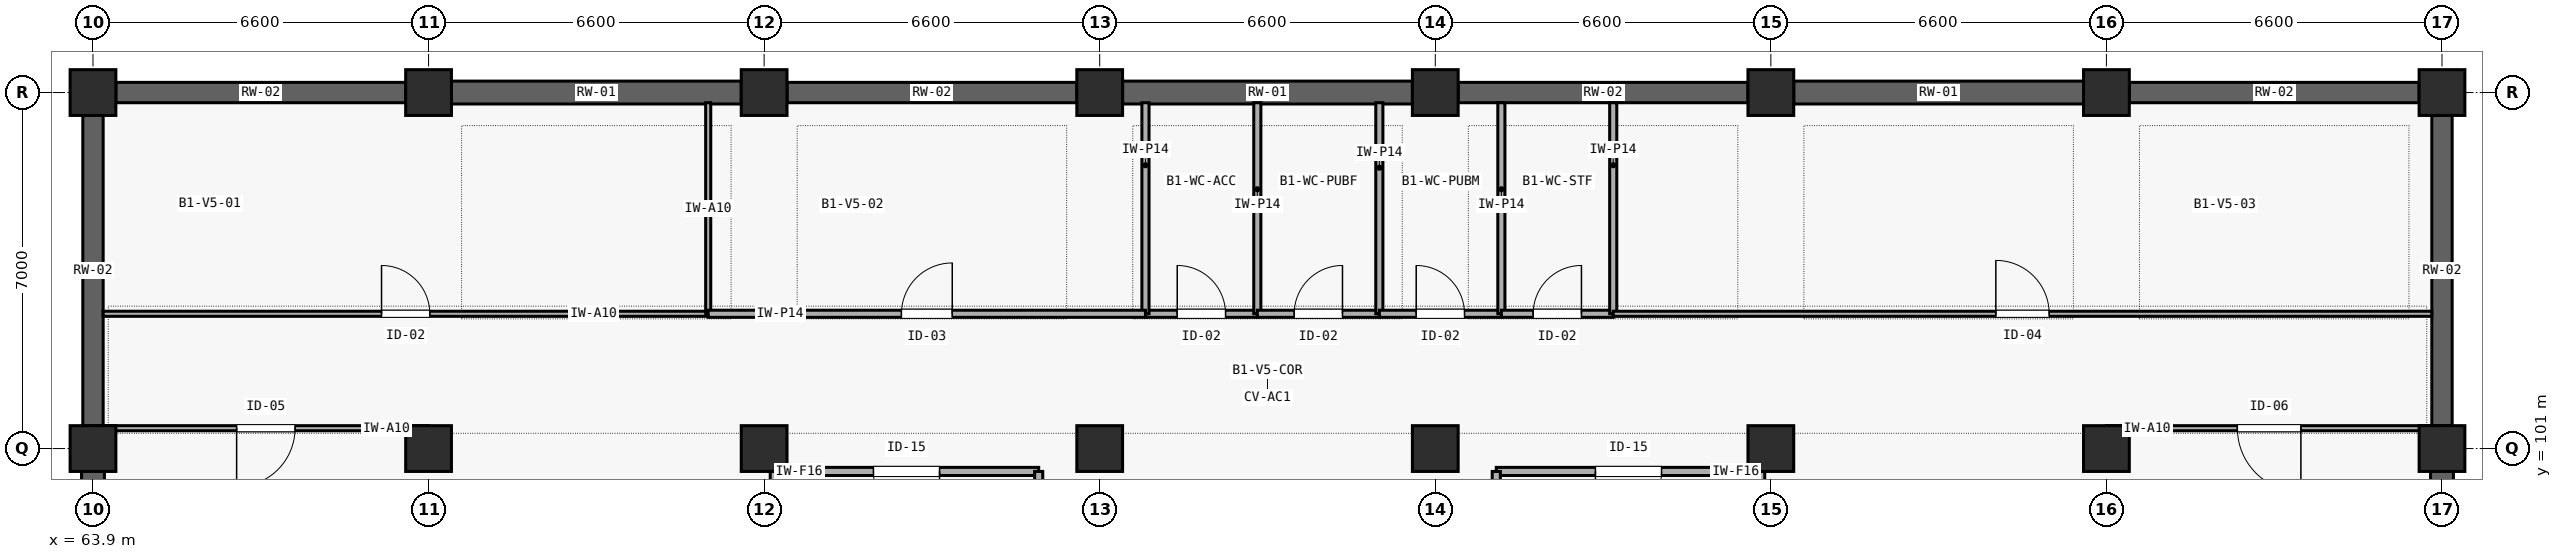
"""IFC4 building model, lengths in metres.
Left out: names, types, materials, properties, quantities, classifications, styles, units other than length and angle.
Written with IfcOpenShell. Run it as: python <this file> out.ifc"""

import sys

from ifc_helpers import new_model, si_unit, direction, frame, frame_2d, origin, origin_2d, place, context, subcontext, project, spatial, rectangle, extrude, element, fill, save


model = new_model("IFC4")
c1 = context("Model", 3, precision=1e-05, world=origin(), true_north=direction((0.0, 1.0)))
c2 = subcontext(c1, "Body", "Model", "MODEL_VIEW")
j1 = project(units=[si_unit("LENGTHUNIT", "METRE"), si_unit("PLANEANGLEUNIT", "RADIAN")], contexts=[c1])
p1 = place(None, origin())
s1 = spatial("IfcSite", under=j1, at=p1, CompositionType="ELEMENT")
p2 = place(p1, origin())
s2 = spatial("IfcBuilding", under=s1, at=p2, CompositionType="ELEMENT")
p3 = place(p2, frame((0.0, 0.0, -4.2)))
s3 = spatial("IfcBuildingStorey", under=s2, at=p3, CompositionType="ELEMENT", Elevation=-4.2)
for number, where, z_axis, x_axis in (
    (1, (63.9, 101.0, -0.4), (0.0, 0.0, 1.0), (1.0, 0.0, 0.0)),
    (2, (63.9, 108.0, -0.4), (0.0, 0.0, 1.0), (1.0, 0.0, 0.0)),
    (3, (70.5, 101.0, -0.4), (0.0, 0.0, 1.0), (1.0, 0.0, 0.0)),
    (4, (70.5, 108.0, -0.4), (0.0, 0.0, 1.0), (1.0, 0.0, 0.0)),
    (5, (77.1, 101.0, -0.4), (0.0, 0.0, 1.0), (1.0, 0.0, 0.0)),
    (6, (77.1, 108.0, -0.4), (0.0, 0.0, 1.0), (1.0, 0.0, 0.0)),
    (7, (83.7, 101.0, -0.4), (0.0, 0.0, 1.0), (1.0, 0.0, 0.0)),
    (8, (83.7, 108.0, -0.4), (0.0, 0.0, 1.0), (1.0, 0.0, 0.0)),
    (9, (90.3, 101.0, -0.4), (0.0, 0.0, 1.0), (1.0, 0.0, 0.0)),
    (10, (90.3, 108.0, -0.4), (0.0, 0.0, 1.0), (1.0, 0.0, 0.0)),
    (11, (96.9, 101.0, -0.4), (0.0, 0.0, 1.0), (1.0, 0.0, 0.0)),
    (12, (96.9, 108.0, -0.4), (0.0, 0.0, 1.0), (1.0, 0.0, 0.0)),
    (13, (103.5, 101.0, -0.4), (0.0, 0.0, 1.0), (1.0, 0.0, 0.0)),
    (14, (103.5, 108.0, -0.4), (0.0, 0.0, 1.0), (1.0, 0.0, 0.0)),
    (15, (110.1, 101.0, -0.4), (0.0, 0.0, 1.0), (1.0, 0.0, 0.0)),
    (16, (110.1, 108.0, -0.4), (0.0, 0.0, 1.0), (1.0, 0.0, 0.0)),
):
    element("IfcColumn", number, at=place(p3, frame(where, z_axis=z_axis, x_axis=x_axis)), inside=s3, PredefinedType="COLUMN", context=c2, shape_type="SweptSolid", body=[
        extrude(rectangle(XDim=0.9, YDim=0.9, at=origin_2d()), origin(), (0.0, 0.0, 1.0), 4.6),
    ])
p4 = place(p3, frame((64.35, 108.0, 0.0), z_axis=(0.0, 0.0, 1.0), x_axis=(1.0, 0.0, 0.0)))
e17 = element("IfcWall", 17, at=p4, inside=s3, PredefinedType="SHEAR", context=c2, shape_type="SweptSolid", body=[
    extrude(rectangle(XDim=5.7, YDim=0.4, at=frame_2d((2.85, 0.0))), origin(), (0.0, 0.0, 1.0), 3.85),
])
p5 = place(p3, frame((70.95, 108.0, 0.0), z_axis=(0.0, 0.0, 1.0), x_axis=(1.0, 0.0, 0.0)))
e18 = element("IfcWall", 18, at=p5, inside=s3, PredefinedType="SHEAR", context=c2, shape_type="SweptSolid", body=[
    extrude(rectangle(XDim=5.7, YDim=0.45, at=frame_2d((2.85, 0.0))), origin(), (0.0, 0.0, 1.0), 3.85),
])
p6 = place(p3, frame((77.55, 108.0, 0.0), z_axis=(0.0, 0.0, 1.0), x_axis=(1.0, 0.0, 0.0)))
e19 = element("IfcWall", 19, at=p6, inside=s3, PredefinedType="SHEAR", context=c2, shape_type="SweptSolid", body=[
    extrude(rectangle(XDim=5.7, YDim=0.4, at=frame_2d((2.85, 0.0))), origin(), (0.0, 0.0, 1.0), 3.85),
])
p7 = place(p3, frame((84.15, 108.0, 0.0), z_axis=(0.0, 0.0, 1.0), x_axis=(1.0, 0.0, 0.0)))
e20 = element("IfcWall", 20, at=p7, inside=s3, PredefinedType="SHEAR", context=c2, shape_type="SweptSolid", body=[
    extrude(rectangle(XDim=5.7, YDim=0.45, at=frame_2d((2.85, 0.0))), origin(), (0.0, 0.0, 1.0), 3.85),
])
p8 = place(p3, frame((90.75, 108.0, 0.0), z_axis=(0.0, 0.0, 1.0), x_axis=(1.0, 0.0, 0.0)))
e21 = element("IfcWall", 21, at=p8, inside=s3, PredefinedType="SHEAR", context=c2, shape_type="SweptSolid", body=[
    extrude(rectangle(XDim=5.7, YDim=0.4, at=frame_2d((2.85, 0.0))), origin(), (0.0, 0.0, 1.0), 3.85),
])
p9 = place(p3, frame((97.35, 108.0, 0.0), z_axis=(0.0, 0.0, 1.0), x_axis=(1.0, 0.0, 0.0)))
e22 = element("IfcWall", 22, at=p9, inside=s3, PredefinedType="SHEAR", context=c2, shape_type="SweptSolid", body=[
    extrude(rectangle(XDim=5.7, YDim=0.45, at=frame_2d((2.85, 0.0))), origin(), (0.0, 0.0, 1.0), 3.85),
])
p10 = place(p3, frame((103.95, 108.0, 0.0), z_axis=(0.0, 0.0, 1.0), x_axis=(1.0, 0.0, 0.0)))
e23 = element("IfcWall", 23, at=p10, inside=s3, PredefinedType="SHEAR", context=c2, shape_type="SweptSolid", body=[
    extrude(rectangle(XDim=5.7, YDim=0.4, at=frame_2d((2.85, 0.0))), origin(), (0.0, 0.0, 1.0), 3.85),
])
p11 = place(p3, frame((63.9, 94.35, 0.0), z_axis=(0.0, 0.0, 1.0), x_axis=(0.0, 1.0, 0.0)))
e24 = element("IfcWall", 24, at=p11, inside=s3, PredefinedType="SHEAR", context=c2, shape_type="SweptSolid", body=[
    extrude(rectangle(XDim=6.2, YDim=0.45, at=frame_2d((3.1, 0.0))), origin(), (0.0, 0.0, 1.0), 3.85),
])
p12 = place(p3, frame((63.9, 101.45, 0.0), z_axis=(0.0, 0.0, 1.0), x_axis=(0.0, 1.0, 0.0)))
e25 = element("IfcWall", 25, at=p12, inside=s3, PredefinedType="SHEAR", context=c2, shape_type="SweptSolid", body=[
    extrude(rectangle(XDim=6.1, YDim=0.4, at=frame_2d((3.05, 0.0))), origin(), (0.0, 0.0, 1.0), 3.85),
])
p13 = place(p3, frame((110.1, 94.35, 0.0), z_axis=(0.0, 0.0, 1.0), x_axis=(0.0, 1.0, 0.0)))
e26 = element("IfcWall", 26, at=p13, inside=s3, PredefinedType="SHEAR", context=c2, shape_type="SweptSolid", body=[
    extrude(rectangle(XDim=6.2, YDim=0.45, at=frame_2d((3.1, 0.0))), origin(), (0.0, 0.0, 1.0), 3.85),
])
p14 = place(p3, frame((110.1, 101.45, 0.0), z_axis=(0.0, 0.0, 1.0), x_axis=(0.0, 1.0, 0.0)))
e27 = element("IfcWall", 27, at=p14, inside=s3, PredefinedType="SHEAR", context=c2, shape_type="SweptSolid", body=[
    extrude(rectangle(XDim=6.1, YDim=0.4, at=frame_2d((3.05, 0.0))), origin(), (0.0, 0.0, 1.0), 3.85),
])
p15 = place(p3, frame((77.3, 100.55, 0.0), z_axis=(0.0, 0.0, 1.0), x_axis=(1.0, 0.0, 0.0)))
e28 = element("IfcWall", 28, at=p15, inside=s3, PredefinedType="SOLIDWALL", context=c2, shape_type="SweptSolid", body=[
    extrude(rectangle(XDim=5.2, YDim=0.16, at=frame_2d((2.6, 0.0))), origin(), (0.0, 0.0, 1.0), 3.9),
])
p16 = place(p15, frame((1.95, 0.0, 0.0)))
e29 = element("IfcOpeningElement", 29, at=p16, cuts=e28, PredefinedType="OPENING", context=c2, shape_type="SweptSolid", body=[
    extrude(rectangle(XDim=1.3, YDim=2.15, at=frame_2d((0.65, 1.075))), frame((0.0, 0.09, 0.0), z_axis=(0.0, -1.0, 0.0), x_axis=(1.0, 0.0, 0.0)), (0.0, 0.0, 1.0), 0.18),
])
p17 = place(p3, frame((77.3, 97.5, 0.0), z_axis=(0.0, 0.0, 1.0), x_axis=(0.0, 1.0, 0.0)))
e30 = element("IfcWall", 30, at=p17, inside=s3, PredefinedType="SOLIDWALL", context=c2, shape_type="SweptSolid", body=[
    extrude(rectangle(XDim=3.05, YDim=0.16, at=frame_2d((1.525, 0.0))), origin(), (0.0, 0.0, 1.0), 3.405),
])
p18 = place(p3, frame((82.5, 97.5, 0.0), z_axis=(0.0, 0.0, 1.0), x_axis=(0.0, 1.0, 0.0)))
e31 = element("IfcWall", 31, at=p18, inside=s3, PredefinedType="SOLIDWALL", context=c2, shape_type="SweptSolid", body=[
    extrude(rectangle(XDim=3.05, YDim=0.16, at=frame_2d((1.525, 0.0))), origin(), (0.0, 0.0, 1.0), 3.9),
])
p19 = place(p3, frame((91.5, 100.55, 0.0), z_axis=(0.0, 0.0, 1.0), x_axis=(1.0, 0.0, 0.0)))
e32 = element("IfcWall", 32, at=p19, inside=s3, PredefinedType="SOLIDWALL", context=c2, shape_type="SweptSolid", body=[
    extrude(rectangle(XDim=5.2, YDim=0.16, at=frame_2d((2.6, 0.0))), origin(), (0.0, 0.0, 1.0), 3.9),
])
p20 = place(p19, frame((1.95, 0.0, 0.0)))
e33 = element("IfcOpeningElement", 33, at=p20, cuts=e32, PredefinedType="OPENING", context=c2, shape_type="SweptSolid", body=[
    extrude(rectangle(XDim=1.3, YDim=2.15, at=frame_2d((0.65, 1.075))), frame((0.0, 0.09, 0.0), z_axis=(0.0, -1.0, 0.0), x_axis=(1.0, 0.0, 0.0)), (0.0, 0.0, 1.0), 0.18),
])
p21 = place(p3, frame((91.5, 97.5, 0.0), z_axis=(0.0, 0.0, 1.0), x_axis=(0.0, 1.0, 0.0)))
e34 = element("IfcWall", 34, at=p21, inside=s3, PredefinedType="SOLIDWALL", context=c2, shape_type="SweptSolid", body=[
    extrude(rectangle(XDim=3.05, YDim=0.16, at=frame_2d((1.525, 0.0))), origin(), (0.0, 0.0, 1.0), 3.9),
])
p22 = place(p3, frame((96.7, 97.5, 0.0), z_axis=(0.0, 0.0, 1.0), x_axis=(0.0, 1.0, 0.0)))
e35 = element("IfcWall", 35, at=p22, inside=s3, PredefinedType="SOLIDWALL", context=c2, shape_type="SweptSolid", body=[
    extrude(rectangle(XDim=3.05, YDim=0.16, at=frame_2d((1.525, 0.0))), origin(), (0.0, 0.0, 1.0), 3.405),
])
p23 = place(p3, frame((84.6, 103.65, 0.0), z_axis=(0.0, 0.0, 1.0), x_axis=(1.0, 0.0, 0.0)))
e36 = element("IfcWall", 36, at=p23, inside=s3, PredefinedType="PLUMBINGWALL", context=c2, shape_type="SweptSolid", body=[
    extrude(rectangle(XDim=2.2, YDim=0.14, at=frame_2d((1.1, 0.0))), origin(), (0.0, 0.0, 1.0), 3.9),
])
p24 = place(p23, frame((0.625, 0.0, 0.0)))
e37 = element("IfcOpeningElement", 37, at=p24, cuts=e36, PredefinedType="OPENING", context=c2, shape_type="SweptSolid", body=[
    extrude(rectangle(XDim=0.95, YDim=2.1, at=frame_2d((0.475, 1.05))), frame((0.0, 0.08, 0.0), z_axis=(0.0, -1.0, 0.0), x_axis=(1.0, 0.0, 0.0)), (0.0, 0.0, 1.0), 0.16),
])
for number, where, z_axis, x_axis in (
    (38, (84.6, 103.65, 0.0), (0.0, 0.0, 1.0), (0.0, 1.0, 0.0)),
    (39, (86.8, 103.65, 0.0), (0.0, 0.0, 1.0), (0.0, 1.0, 0.0)),
):
    element("IfcWall", number, at=place(p3, frame(where, z_axis=z_axis, x_axis=x_axis)), inside=s3, PredefinedType="PLUMBINGWALL", context=c2, shape_type="SweptSolid", body=[
        extrude(rectangle(XDim=4.15, YDim=0.14, at=frame_2d((2.075, 0.0))), origin(), (0.0, 0.0, 1.0), 3.9),
    ])
p25 = place(p3, frame((86.8, 103.65, 0.0), z_axis=(0.0, 0.0, 1.0), x_axis=(1.0, 0.0, 0.0)))
e40 = element("IfcWall", 40, at=p25, inside=s3, PredefinedType="PLUMBINGWALL", context=c2, shape_type="SweptSolid", body=[
    extrude(rectangle(XDim=2.4, YDim=0.14, at=frame_2d((1.2, 0.0))), origin(), (0.0, 0.0, 1.0), 3.9),
])
p26 = place(p25, frame((0.725, 0.0, 0.0)))
e41 = element("IfcOpeningElement", 41, at=p26, cuts=e40, PredefinedType="OPENING", context=c2, shape_type="SweptSolid", body=[
    extrude(rectangle(XDim=0.95, YDim=2.1, at=frame_2d((0.475, 1.05))), frame((0.0, 0.08, 0.0), z_axis=(0.0, -1.0, 0.0), x_axis=(1.0, 0.0, 0.0)), (0.0, 0.0, 1.0), 0.16),
])
p27 = place(p3, frame((89.2, 103.65, 0.0), z_axis=(0.0, 0.0, 1.0), x_axis=(0.0, 1.0, 0.0)))
e42 = element("IfcWall", 42, at=p27, inside=s3, PredefinedType="PLUMBINGWALL", context=c2, shape_type="SweptSolid", body=[
    extrude(rectangle(XDim=4.15, YDim=0.14, at=frame_2d((2.075, 0.0))), origin(), (0.0, 0.0, 1.0), 3.9),
])
p28 = place(p3, frame((89.2, 103.65, 0.0), z_axis=(0.0, 0.0, 1.0), x_axis=(1.0, 0.0, 0.0)))
e43 = element("IfcWall", 43, at=p28, inside=s3, PredefinedType="PLUMBINGWALL", context=c2, shape_type="SweptSolid", body=[
    extrude(rectangle(XDim=2.4, YDim=0.14, at=frame_2d((1.2, 0.0))), origin(), (0.0, 0.0, 1.0), 3.9),
])
p29 = place(p28, frame((0.725, 0.0, 0.0)))
e44 = element("IfcOpeningElement", 44, at=p29, cuts=e43, PredefinedType="OPENING", context=c2, shape_type="SweptSolid", body=[
    extrude(rectangle(XDim=0.95, YDim=2.1, at=frame_2d((0.475, 1.05))), frame((0.0, 0.08, 0.0), z_axis=(0.0, -1.0, 0.0), x_axis=(1.0, 0.0, 0.0)), (0.0, 0.0, 1.0), 0.16),
])
p30 = place(p3, frame((91.6, 103.65, 0.0), z_axis=(0.0, 0.0, 1.0), x_axis=(0.0, 1.0, 0.0)))
e45 = element("IfcWall", 45, at=p30, inside=s3, PredefinedType="PLUMBINGWALL", context=c2, shape_type="SweptSolid", body=[
    extrude(rectangle(XDim=4.15, YDim=0.14, at=frame_2d((2.075, 0.0))), origin(), (0.0, 0.0, 1.0), 3.9),
])
p31 = place(p3, frame((91.6, 103.65, 0.0), z_axis=(0.0, 0.0, 1.0), x_axis=(1.0, 0.0, 0.0)))
e46 = element("IfcWall", 46, at=p31, inside=s3, PredefinedType="PLUMBINGWALL", context=c2, shape_type="SweptSolid", body=[
    extrude(rectangle(XDim=2.2, YDim=0.14, at=frame_2d((1.1, 0.0))), origin(), (0.0, 0.0, 1.0), 3.9),
])
p32 = place(p31, frame((0.625, 0.0, 0.0)))
e47 = element("IfcOpeningElement", 47, at=p32, cuts=e46, PredefinedType="OPENING", context=c2, shape_type="SweptSolid", body=[
    extrude(rectangle(XDim=0.95, YDim=2.1, at=frame_2d((0.475, 1.05))), frame((0.0, 0.08, 0.0), z_axis=(0.0, -1.0, 0.0), x_axis=(1.0, 0.0, 0.0)), (0.0, 0.0, 1.0), 0.16),
])
p33 = place(p3, frame((93.8, 103.65, 0.0), z_axis=(0.0, 0.0, 1.0), x_axis=(0.0, 1.0, 0.0)))
e48 = element("IfcWall", 48, at=p33, inside=s3, PredefinedType="PLUMBINGWALL", context=c2, shape_type="SweptSolid", body=[
    extrude(rectangle(XDim=4.15, YDim=0.14, at=frame_2d((2.075, 0.0))), origin(), (0.0, 0.0, 1.0), 3.9),
])
p34 = place(p3, frame((64.1, 103.65, 0.0), z_axis=(0.0, 0.0, 1.0), x_axis=(1.0, 0.0, 0.0)))
e49 = element("IfcWall", 49, at=p34, inside=s3, PredefinedType="PARTITIONING", context=c2, shape_type="SweptSolid", body=[
    extrude(rectangle(XDim=11.9, YDim=0.1, at=frame_2d((5.95, 0.0))), origin(), (0.0, 0.0, 1.0), 3.9),
])
p35 = place(p34, frame((5.475, 0.0, 0.0)))
e50 = element("IfcOpeningElement", 50, at=p35, cuts=e49, PredefinedType="OPENING", context=c2, shape_type="SweptSolid", body=[
    extrude(rectangle(XDim=0.95, YDim=2.1, at=frame_2d((0.475, 1.05))), frame((0.0, 0.06, 0.0), z_axis=(0.0, -1.0, 0.0), x_axis=(1.0, 0.0, 0.0)), (0.0, 0.0, 1.0), 0.12),
])
p36 = place(p3, frame((76.0, 103.65, 0.0), z_axis=(0.0, 0.0, 1.0), x_axis=(0.0, 1.0, 0.0)))
e51 = element("IfcWall", 51, at=p36, inside=s3, PredefinedType="PARTITIONING", context=c2, shape_type="SweptSolid", body=[
    extrude(rectangle(XDim=4.15, YDim=0.1, at=frame_2d((2.075, 0.0))), origin(), (0.0, 0.0, 1.0), 3.9),
])
p37 = place(p3, frame((76.0, 103.65, 0.0), z_axis=(0.0, 0.0, 1.0), x_axis=(1.0, 0.0, 0.0)))
e52 = element("IfcWall", 52, at=p37, inside=s3, PredefinedType="PLUMBINGWALL", context=c2, shape_type="SweptSolid", body=[
    extrude(rectangle(XDim=8.6, YDim=0.14, at=frame_2d((4.3, 0.0))), origin(), (0.0, 0.0, 1.0), 3.9),
])
p38 = place(p37, frame((3.8, 0.0, 0.0)))
e53 = element("IfcOpeningElement", 53, at=p38, cuts=e52, PredefinedType="OPENING", context=c2, shape_type="SweptSolid", body=[
    extrude(rectangle(XDim=1.0, YDim=2.1, at=frame_2d((0.5, 1.05))), frame((0.0, 0.08, 0.0), z_axis=(0.0, -1.0, 0.0), x_axis=(1.0, 0.0, 0.0)), (0.0, 0.0, 1.0), 0.16),
])
p39 = place(p3, frame((93.8, 103.65, 0.0), z_axis=(0.0, 0.0, 1.0), x_axis=(1.0, 0.0, 0.0)))
e54 = element("IfcWall", 54, at=p39, inside=s3, PredefinedType="PARTITIONING", context=c2, shape_type="SweptSolid", body=[
    extrude(rectangle(XDim=16.1, YDim=0.1, at=frame_2d((8.05, 0.0))), origin(), (0.0, 0.0, 1.0), 3.9),
])
p40 = place(p39, frame((7.525, 0.0, 0.0)))
e55 = element("IfcOpeningElement", 55, at=p40, cuts=e54, PredefinedType="OPENING", context=c2, shape_type="SweptSolid", body=[
    extrude(rectangle(XDim=1.05, YDim=2.15, at=frame_2d((0.525, 1.075))), frame((0.0, 0.06, 0.0), z_axis=(0.0, -1.0, 0.0), x_axis=(1.0, 0.0, 0.0)), (0.0, 0.0, 1.0), 0.12),
])
p41 = place(p3, frame((64.1, 101.4, 0.0), z_axis=(0.0, 0.0, 1.0), x_axis=(1.0, 0.0, 0.0)))
e56 = element("IfcWall", 56, at=p41, inside=s3, PredefinedType="PARTITIONING", context=c2, shape_type="SweptSolid", body=[
    extrude(rectangle(XDim=6.4, YDim=0.1, at=frame_2d((3.2, 0.0))), origin(), (0.0, 0.0, 1.0), 3.9),
])
p42 = place(p41, frame((2.625, 0.0, 0.0)))
e57 = element("IfcOpeningElement", 57, at=p42, cuts=e56, PredefinedType="OPENING", context=c2, shape_type="SweptSolid", body=[
    extrude(rectangle(XDim=1.15, YDim=2.15, at=frame_2d((0.575, 1.075))), frame((0.0, 0.06, 0.0), z_axis=(0.0, -1.0, 0.0), x_axis=(1.0, 0.0, 0.0)), (0.0, 0.0, 1.0), 0.12),
])
p43 = place(p3, frame((103.5, 101.4, 0.0), z_axis=(0.0, 0.0, 1.0), x_axis=(1.0, 0.0, 0.0)))
e58 = element("IfcWall", 58, at=p43, inside=s3, PredefinedType="PARTITIONING", context=c2, shape_type="SweptSolid", body=[
    extrude(rectangle(XDim=6.4, YDim=0.1, at=frame_2d((3.2, 0.0))), origin(), (0.0, 0.0, 1.0), 3.9),
])
p44 = place(p43, frame((2.575, 0.0, 0.0)))
e59 = element("IfcOpeningElement", 59, at=p44, cuts=e58, PredefinedType="OPENING", context=c2, shape_type="SweptSolid", body=[
    extrude(rectangle(XDim=1.25, YDim=2.15, at=frame_2d((0.625, 1.075))), frame((0.0, 0.06, 0.0), z_axis=(0.0, -1.0, 0.0), x_axis=(1.0, 0.0, 0.0)), (0.0, 0.0, 1.0), 0.12),
])
p45 = place(p16, frame((1.3, 0.0, 0.0), z_axis=(0.0, 0.0, 1.0), x_axis=(-1.0, 0.0, 0.0)))
e60 = element("IfcDoor", 60, at=p45, inside=s3, OperationType="SINGLE_SWING_LEFT", PredefinedType="DOOR", context=c2, shape_type="SweptSolid", body=[
    extrude(rectangle(XDim=1.3, YDim=2.15, at=frame_2d((0.65, 1.075))), frame((0.0, 0.025, 0.0), z_axis=(0.0, -1.0, 0.0), x_axis=(1.0, 0.0, 0.0)), (0.0, 0.0, 1.0), 0.05),
])
fill(e29, e60)
p46 = place(p20, frame((1.3, 0.0, 0.0), z_axis=(0.0, 0.0, 1.0), x_axis=(-1.0, 0.0, 0.0)))
e61 = element("IfcDoor", 61, at=p46, inside=s3, OperationType="SINGLE_SWING_RIGHT", PredefinedType="DOOR", context=c2, shape_type="SweptSolid", body=[
    extrude(rectangle(XDim=1.3, YDim=2.15, at=frame_2d((0.65, 1.075))), frame((0.0, 0.025, 0.0), z_axis=(0.0, -1.0, 0.0), x_axis=(1.0, 0.0, 0.0)), (0.0, 0.0, 1.0), 0.05),
])
fill(e33, e61)
p47 = place(p24, origin())
e62 = element("IfcDoor", 62, at=p47, inside=s3, OperationType="SINGLE_SWING_LEFT", PredefinedType="DOOR", context=c2, shape_type="SweptSolid", body=[
    extrude(rectangle(XDim=0.95, YDim=2.1, at=frame_2d((0.475, 1.05))), frame((0.0, 0.025, 0.0), z_axis=(0.0, -1.0, 0.0), x_axis=(1.0, 0.0, 0.0)), (0.0, 0.0, 1.0), 0.05),
])
fill(e37, e62)
p48 = place(p26, origin())
e63 = element("IfcDoor", 63, at=p48, inside=s3, OperationType="SINGLE_SWING_RIGHT", PredefinedType="DOOR", context=c2, shape_type="SweptSolid", body=[
    extrude(rectangle(XDim=0.95, YDim=2.1, at=frame_2d((0.475, 1.05))), frame((0.0, 0.025, 0.0), z_axis=(0.0, -1.0, 0.0), x_axis=(1.0, 0.0, 0.0)), (0.0, 0.0, 1.0), 0.05),
])
fill(e41, e63)
p49 = place(p29, origin())
e64 = element("IfcDoor", 64, at=p49, inside=s3, OperationType="SINGLE_SWING_LEFT", PredefinedType="DOOR", context=c2, shape_type="SweptSolid", body=[
    extrude(rectangle(XDim=0.95, YDim=2.1, at=frame_2d((0.475, 1.05))), frame((0.0, 0.025, 0.0), z_axis=(0.0, -1.0, 0.0), x_axis=(1.0, 0.0, 0.0)), (0.0, 0.0, 1.0), 0.05),
])
fill(e44, e64)
p50 = place(p32, origin())
e65 = element("IfcDoor", 65, at=p50, inside=s3, OperationType="SINGLE_SWING_RIGHT", PredefinedType="DOOR", context=c2, shape_type="SweptSolid", body=[
    extrude(rectangle(XDim=0.95, YDim=2.1, at=frame_2d((0.475, 1.05))), frame((0.0, 0.025, 0.0), z_axis=(0.0, -1.0, 0.0), x_axis=(1.0, 0.0, 0.0)), (0.0, 0.0, 1.0), 0.05),
])
fill(e47, e65)
p51 = place(p35, origin())
e66 = element("IfcDoor", 66, at=p51, inside=s3, OperationType="SINGLE_SWING_LEFT", PredefinedType="DOOR", context=c2, shape_type="SweptSolid", body=[
    extrude(rectangle(XDim=0.95, YDim=2.1, at=frame_2d((0.475, 1.05))), frame((0.0, 0.025, 0.0), z_axis=(0.0, -1.0, 0.0), x_axis=(1.0, 0.0, 0.0)), (0.0, 0.0, 1.0), 0.05),
])
fill(e50, e66)
p52 = place(p38, origin())
e67 = element("IfcDoor", 67, at=p52, inside=s3, OperationType="SINGLE_SWING_RIGHT", PredefinedType="DOOR", context=c2, shape_type="SweptSolid", body=[
    extrude(rectangle(XDim=1.0, YDim=2.1, at=frame_2d((0.5, 1.05))), frame((0.0, 0.025, 0.0), z_axis=(0.0, -1.0, 0.0), x_axis=(1.0, 0.0, 0.0)), (0.0, 0.0, 1.0), 0.05),
])
fill(e53, e67)
p53 = place(p40, origin())
e68 = element("IfcDoor", 68, at=p53, inside=s3, OperationType="SINGLE_SWING_LEFT", PredefinedType="DOOR", context=c2, shape_type="SweptSolid", body=[
    extrude(rectangle(XDim=1.05, YDim=2.15, at=frame_2d((0.525, 1.075))), frame((0.0, 0.025, 0.0), z_axis=(0.0, -1.0, 0.0), x_axis=(1.0, 0.0, 0.0)), (0.0, 0.0, 1.0), 0.05),
])
fill(e55, e68)
p54 = place(p42, frame((1.15, 0.0, 0.0), z_axis=(0.0, 0.0, 1.0), x_axis=(-1.0, 0.0, 0.0)))
e69 = element("IfcDoor", 69, at=p54, inside=s3, OperationType="SINGLE_SWING_RIGHT", PredefinedType="DOOR", context=c2, shape_type="SweptSolid", body=[
    extrude(rectangle(XDim=1.15, YDim=2.15, at=frame_2d((0.575, 1.075))), frame((0.0, 0.025, 0.0), z_axis=(0.0, -1.0, 0.0), x_axis=(1.0, 0.0, 0.0)), (0.0, 0.0, 1.0), 0.05),
])
fill(e57, e69)
p55 = place(p44, frame((1.25, 0.0, 0.0), z_axis=(0.0, 0.0, 1.0), x_axis=(-1.0, 0.0, 0.0)))
e70 = element("IfcDoor", 70, at=p55, inside=s3, OperationType="SINGLE_SWING_LEFT", PredefinedType="DOOR", context=c2, shape_type="SweptSolid", body=[
    extrude(rectangle(XDim=1.25, YDim=2.15, at=frame_2d((0.625, 1.075))), frame((0.0, 0.025, 0.0), z_axis=(0.0, -1.0, 0.0), x_axis=(1.0, 0.0, 0.0)), (0.0, 0.0, 1.0), 0.05),
])
fill(e59, e70)
save(model, sys.argv[1])
